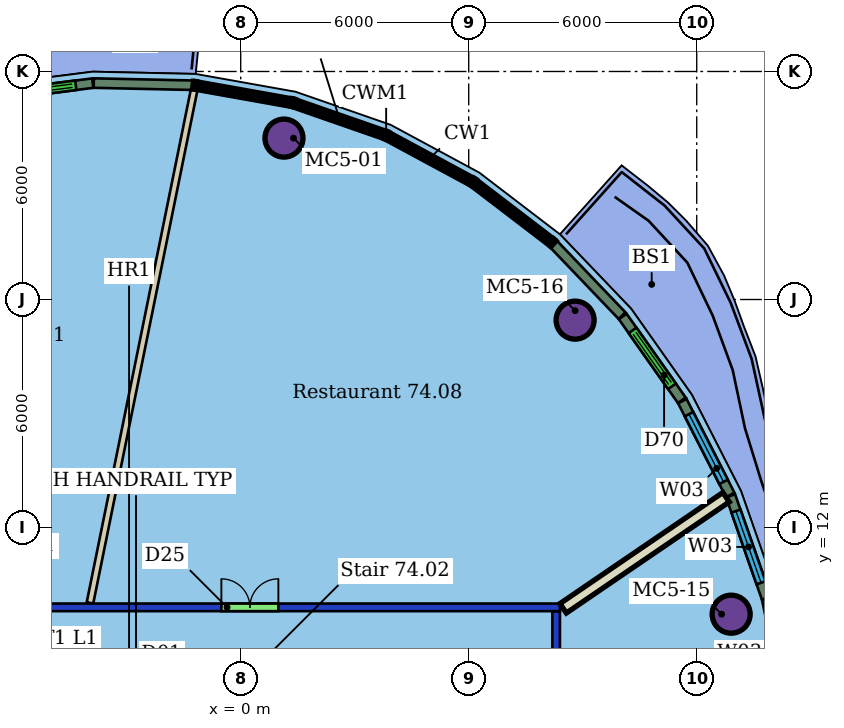
"""IFC4 building model, lengths in metres.
Left out: names, types, materials, properties, quantities, classifications, styles, units other than length and angle.
Written with IfcOpenShell. Run it as: python <this file> out.ifc"""

import sys

from ifc_helpers import new_model, si_unit, direction, frame, frame_2d, origin, origin_2d, place, context, subcontext, project, spatial, rectangle, hollow_circle, extrude, element, fill, save


model = new_model("IFC4")
c1 = context("Model", 3, precision=1e-05, world=origin(), true_north=direction((0.0, 1.0)))
c2 = subcontext(c1, "Body", "Model", "MODEL_VIEW")
j1 = project(units=[si_unit("LENGTHUNIT", "METRE"), si_unit("PLANEANGLEUNIT", "RADIAN")], contexts=[c1])
p1 = place(None, origin())
s1 = spatial("IfcSite", under=j1, at=p1, CompositionType="ELEMENT")
p2 = place(p1, origin())
s2 = spatial("IfcBuilding", under=s1, at=p2, CompositionType="ELEMENT")
p3 = place(p2, frame((0.0, 0.0, 297.3)))
s3 = spatial("IfcBuildingStorey", under=s2, at=p3, CompositionType="ELEMENT", Elevation=297.3)
for number, where, z_axis, x_axis in (
    (1, (1.138, 22.247, 0.0), (0.0, 0.0, 1.0), (1.0, 0.0, 0.0)),
    (2, (12.906, 9.72, 0.0), (0.0, 0.0, 1.0), (1.0, 0.0, 0.0)),
    (3, (8.8, 17.457, 0.0), (0.0, 0.0, 1.0), (1.0, 0.0, 0.0)),
):
    element("IfcColumn", number, at=place(p3, frame(where, z_axis=z_axis, x_axis=x_axis)), inside=s3, PredefinedType="COLUMN", context=c2, shape_type="SweptSolid", body=[
        extrude(hollow_circle(Radius=0.5, WallThickness=0.04, at=origin_2d()), origin(), (0.0, 0.0, 1.0), 3.45),
    ])
p4 = place(p3, frame((-20.4, 9.9, 0.0), z_axis=(0.0, 0.0, 1.0), x_axis=(1.0, 0.0, 0.0)))
e4 = element("IfcWall", 4, at=p4, inside=s3, PredefinedType="PARTITIONING", context=c2, shape_type="SweptSolid", body=[
    extrude(rectangle(XDim=28.8, YDim=0.2, at=frame_2d((14.4, 0.0))), origin(), (0.0, 0.0, 1.0), 3.1),
])
p5 = place(p4, frame((11.686, 0.0, 0.0)))
e5 = element("IfcOpeningElement", 5, at=p5, cuts=e4, PredefinedType="OPENING", context=c2, shape_type="SweptSolid", body=[
    extrude(rectangle(XDim=1.8, YDim=2.1, at=frame_2d((0.9, 1.05))), frame((0.0, 0.11, 0.0), z_axis=(0.0, -1.0, 0.0), x_axis=(1.0, 0.0, 0.0)), (0.0, 0.0, 1.0), 0.22),
])
p6 = place(p4, frame((5.897, 0.0, 0.0)))
e6 = element("IfcOpeningElement", 6, at=p6, cuts=e4, PredefinedType="OPENING", context=c2, shape_type="SweptSolid", body=[
    extrude(rectangle(XDim=1.5, YDim=2.1, at=frame_2d((0.75, 1.05))), frame((0.0, 0.11, 0.0), z_axis=(0.0, -1.0, 0.0), x_axis=(1.0, 0.0, 0.0)), (0.0, 0.0, 1.0), 0.22),
])
p7 = place(p4, frame((19.891, 0.0, 0.0)))
e7 = element("IfcOpeningElement", 7, at=p7, cuts=e4, PredefinedType="OPENING", context=c2, shape_type="SweptSolid", body=[
    extrude(rectangle(XDim=1.5, YDim=2.4, at=frame_2d((0.75, 1.2))), frame((0.0, 0.11, 0.0), z_axis=(0.0, -1.0, 0.0), x_axis=(1.0, 0.0, 0.0)), (0.0, 0.0, 1.0), 0.22),
])
p8 = place(p3, frame((8.3, 9.8, 0.0), z_axis=(0.0, 0.0, 1.0), x_axis=(0.0, -1.0, 0.0)))
e8 = element("IfcWall", 8, at=p8, inside=s3, PredefinedType="PARTITIONING", context=c2, shape_type="SweptSolid", body=[
    extrude(rectangle(XDim=19.6, YDim=0.2, at=frame_2d((9.8, 0.0))), origin(), (0.0, 0.0, 1.0), 3.1),
])
p9 = place(p8, frame((11.929, 0.0, 0.0)))
e9 = element("IfcOpeningElement", 9, at=p9, cuts=e8, PredefinedType="OPENING", context=c2, shape_type="SweptSolid", body=[
    extrude(rectangle(XDim=1.8, YDim=2.4, at=frame_2d((0.9, 1.2))), frame((0.0, 0.11, 0.0), z_axis=(0.0, -1.0, 0.0), x_axis=(1.0, 0.0, 0.0)), (0.0, 0.0, 1.0), 0.22),
])
p10 = place(p3, frame((-1.226, 23.512, 0.0), z_axis=(0.0, 0.0, 1.0), x_axis=(-0.19897585387, -0.980004392631, 0.0)))
e10 = element("IfcWall", 10, at=p10, inside=s3, PredefinedType="PARTITIONING", context=c2, shape_type="SweptSolid", body=[
    extrude(rectangle(XDim=13.771, YDim=0.175, at=frame_2d((6.885, 0.0))), origin(), (0.0, 0.0, 1.0), 3.45),
])
p11 = place(p3, frame((12.772, 12.797, 0.0), z_axis=(0.0, 0.0, 1.0), x_axis=(-0.826281084678, -0.563257995152, 0.0)))
e11 = element("IfcWall", 11, at=p11, inside=s3, PredefinedType="PARTITIONING", context=c2, shape_type="SweptSolid", body=[
    extrude(rectangle(XDim=5.19, YDim=0.3, at=frame_2d((2.595, 0.0))), origin(), (0.0, 0.0, 1.0), 3.45),
])
p12 = place(p3, frame((-1.269, 23.638, 0.0), z_axis=(0.0, 0.0, 1.0), x_axis=(-0.999760314133, 0.021893247481, 0.0)))
e12 = element("IfcWall", 12, at=p12, inside=s3, PredefinedType="SOLIDWALL", context=c2, shape_type="SweptSolid", body=[
    extrude(rectangle(XDim=2.598, YDim=0.25, at=frame_2d((1.299, 0.0))), origin(), (0.0, 0.0, 1.0), 3.15),
])
p13 = place(p3, frame((-3.893, 23.694, 0.0), z_axis=(0.0, 0.0, 1.0), x_axis=(-0.991933339644, -0.126760599962, 0.0)))
e13 = element("IfcWall", 13, at=p13, inside=s3, PredefinedType="SOLIDWALL", context=c2, shape_type="SweptSolid", body=[
    extrude(rectangle(XDim=2.7, YDim=0.25, at=frame_2d((1.35, 0.0))), origin(), (0.0, 0.0, 1.0), 3.15),
])
p14 = place(p13, frame((0.45, 0.0, 0.0)))
e14 = element("IfcOpeningElement", 14, at=p14, cuts=e13, PredefinedType="OPENING", context=c2, shape_type="SweptSolid", body=[
    extrude(rectangle(XDim=1.8, YDim=2.4, at=frame_2d((0.9, 1.2))), frame((0.0, 0.135, 0.0), z_axis=(0.0, -1.0, 0.0), x_axis=(1.0, 0.0, 0.0)), (0.0, 0.0, 1.0), 0.27),
])
p15 = place(p3, frame((14.446, 7.256, 0.0), z_axis=(0.0, 0.0, 1.0), x_axis=(-0.206909487165, 0.978360089191, 0.0)))
e15 = element("IfcWall", 15, at=p15, inside=s3, PredefinedType="SOLIDWALL", context=c2, shape_type="SweptSolid", body=[
    extrude(rectangle(XDim=2.929, YDim=0.25, at=frame_2d((1.464, 0.0))), origin(), (0.0, 0.0, 1.0), 3.15),
])
p16 = place(p15, frame((0.464, 0.0, 0.9)))
e16 = element("IfcOpeningElement", 16, at=p16, cuts=e15, PredefinedType="OPENING", context=c2, shape_type="SweptSolid", body=[
    extrude(rectangle(XDim=2.0, YDim=2.1, at=frame_2d((1.0, 1.05))), frame((0.0, 0.135, 0.0), z_axis=(0.0, -1.0, 0.0), x_axis=(1.0, 0.0, 0.0)), (0.0, 0.0, 1.0), 0.27),
])
p17 = place(p3, frame((13.833, 10.145, 0.0), z_axis=(0.0, 0.0, 1.0), x_axis=(-0.330480153195, 0.943812941395, 0.0)))
e17 = element("IfcWall", 17, at=p17, inside=s3, PredefinedType="SOLIDWALL", context=c2, shape_type="SweptSolid", body=[
    extrude(rectangle(XDim=2.85, YDim=0.25, at=frame_2d((1.425, 0.0))), origin(), (0.0, 0.0, 1.0), 3.15),
])
p18 = place(p17, frame((0.425, 0.0, 0.9)))
e18 = element("IfcOpeningElement", 18, at=p18, cuts=e17, PredefinedType="OPENING", context=c2, shape_type="SweptSolid", body=[
    extrude(rectangle(XDim=2.0, YDim=2.1, at=frame_2d((1.0, 1.05))), frame((0.0, 0.135, 0.0), z_axis=(0.0, -1.0, 0.0), x_axis=(1.0, 0.0, 0.0)), (0.0, 0.0, 1.0), 0.27),
])
p19 = place(p3, frame((12.882, 12.858, 0.0), z_axis=(0.0, 0.0, 1.0), x_axis=(-0.454701355294, 0.890643967865, 0.0)))
e19 = element("IfcWall", 19, at=p19, inside=s3, PredefinedType="SOLIDWALL", context=c2, shape_type="SweptSolid", body=[
    extrude(rectangle(XDim=2.772, YDim=0.25, at=frame_2d((1.386, 0.0))), origin(), (0.0, 0.0, 1.0), 3.15),
])
p20 = place(p19, frame((0.386, 0.0, 0.9)))
e20 = element("IfcOpeningElement", 20, at=p20, cuts=e19, PredefinedType="OPENING", context=c2, shape_type="SweptSolid", body=[
    extrude(rectangle(XDim=2.0, YDim=2.1, at=frame_2d((1.0, 1.05))), frame((0.0, 0.135, 0.0), z_axis=(0.0, -1.0, 0.0), x_axis=(1.0, 0.0, 0.0)), (0.0, 0.0, 1.0), 0.27),
])
p21 = place(p3, frame((11.608, 15.349, 0.0), z_axis=(0.0, 0.0, 1.0), x_axis=(-0.576395629651, 0.817170776594, 0.0)))
e21 = element("IfcWall", 21, at=p21, inside=s3, PredefinedType="SOLIDWALL", context=c2, shape_type="SweptSolid", body=[
    extrude(rectangle(XDim=2.7, YDim=0.25, at=frame_2d((1.35, 0.0))), origin(), (0.0, 0.0, 1.0), 3.15),
])
p22 = place(p21, frame((0.45, 0.0, 0.0)))
e22 = element("IfcOpeningElement", 22, at=p22, cuts=e21, PredefinedType="OPENING", context=c2, shape_type="SweptSolid", body=[
    extrude(rectangle(XDim=1.8, YDim=2.4, at=frame_2d((0.9, 1.2))), frame((0.0, 0.135, 0.0), z_axis=(0.0, -1.0, 0.0), x_axis=(1.0, 0.0, 0.0)), (0.0, 0.0, 1.0), 0.27),
])
p23 = place(p3, frame((10.035, 17.576, 0.0), z_axis=(0.0, 0.0, 1.0), x_axis=(-0.691337834589, 0.722531659145, 0.0)))
e23 = element("IfcWall", 23, at=p23, inside=s3, PredefinedType="SOLIDWALL", context=c2, shape_type="SweptSolid", body=[
    extrude(rectangle(XDim=2.598, YDim=0.25, at=frame_2d((1.299, 0.0))), origin(), (0.0, 0.0, 1.0), 3.15),
])
p24 = place(p7, origin())
e24 = element("IfcDoor", 24, at=p24, inside=s3, OperationType="DOUBLE_DOOR_SINGLE_SWING", PredefinedType="DOOR", context=c2, shape_type="SweptSolid", body=[
    extrude(rectangle(XDim=1.5, YDim=2.4, at=frame_2d((0.75, 1.2))), frame((0.0, 0.025, 0.0), z_axis=(0.0, -1.0, 0.0), x_axis=(1.0, 0.0, 0.0)), (0.0, 0.0, 1.0), 0.05),
])
fill(e7, e24)
p25 = place(p14, origin())
e25 = element("IfcDoor", 25, at=p25, inside=s3, OperationType="DOUBLE_DOOR_SLIDING", PredefinedType="DOOR", context=c2, shape_type="SweptSolid", body=[
    extrude(rectangle(XDim=1.8, YDim=2.4, at=frame_2d((0.9, 1.2))), frame((0.0, 0.025, 0.0), z_axis=(0.0, -1.0, 0.0), x_axis=(1.0, 0.0, 0.0)), (0.0, 0.0, 1.0), 0.05),
])
fill(e14, e25)
p26 = place(p18, origin())
e26 = element("IfcWindow", 26, at=p26, inside=s3, PartitioningType="SINGLE_PANEL", PredefinedType="WINDOW", context=c2, shape_type="SweptSolid", body=[
    extrude(rectangle(XDim=2.0, YDim=2.1, at=frame_2d((1.0, 1.05))), frame((0.0, 0.03, 0.0), z_axis=(0.0, -1.0, 0.0), x_axis=(1.0, 0.0, 0.0)), (0.0, 0.0, 1.0), 0.06),
])
fill(e18, e26)
p27 = place(p20, origin())
e27 = element("IfcWindow", 27, at=p27, inside=s3, PartitioningType="SINGLE_PANEL", PredefinedType="WINDOW", context=c2, shape_type="SweptSolid", body=[
    extrude(rectangle(XDim=2.0, YDim=2.1, at=frame_2d((1.0, 1.05))), frame((0.0, 0.03, 0.0), z_axis=(0.0, -1.0, 0.0), x_axis=(1.0, 0.0, 0.0)), (0.0, 0.0, 1.0), 0.06),
])
fill(e20, e27)
p28 = place(p22, origin())
e28 = element("IfcDoor", 28, at=p28, inside=s3, OperationType="DOUBLE_DOOR_SLIDING", PredefinedType="DOOR", context=c2, shape_type="SweptSolid", body=[
    extrude(rectangle(XDim=1.8, YDim=2.4, at=frame_2d((0.9, 1.2))), frame((0.0, 0.025, 0.0), z_axis=(0.0, -1.0, 0.0), x_axis=(1.0, 0.0, 0.0)), (0.0, 0.0, 1.0), 0.05),
])
fill(e22, e28)
save(model, sys.argv[1])
